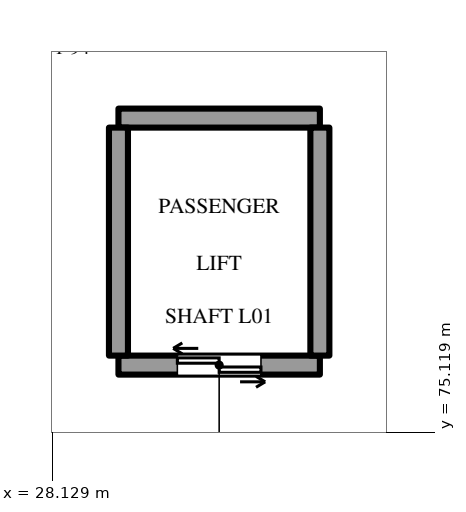
"""IFC4 building model, lengths in metres.
Left out: names, types, materials, properties, quantities, classifications, styles, units other than length and angle.
Written with IfcOpenShell. Run it as: python <this file> out.ifc"""

import sys

from ifc_helpers import new_model, si_unit, direction, frame, frame_2d, origin, place, context, subcontext, project, spatial, rectangle, extrude, element, fill, save


model = new_model("IFC4")
c1 = context("Model", 3, precision=1e-05, world=origin(), true_north=direction((0.0, 1.0)))
c2 = subcontext(c1, "Body", "Model", "MODEL_VIEW")
j1 = project(units=[si_unit("LENGTHUNIT", "METRE"), si_unit("PLANEANGLEUNIT", "RADIAN")], contexts=[c1])
p1 = place(None, origin())
s1 = spatial("IfcSite", under=j1, at=p1, CompositionType="ELEMENT")
p2 = place(p1, origin())
s2 = spatial("IfcBuilding", under=s1, at=p2, CompositionType="ELEMENT")
p3 = place(p2, frame((0.0, 0.0, 7.2)))
s3 = spatial("IfcBuildingStorey", under=s2, at=p3, CompositionType="ELEMENT", Elevation=7.2)
p4 = place(p3, frame((29.0, 76.0, 0.0), z_axis=(0.0, 0.0, 1.0), x_axis=(1.0, 0.0, 0.0)))
e1 = element("IfcWall", 1, at=p4, inside=s3, PredefinedType="SOLIDWALL", context=c2, shape_type="SweptSolid", body=[
    extrude(rectangle(XDim=2.65, YDim=0.25, at=frame_2d((1.325, 0.0))), origin(), (0.0, 0.0, 1.0), 4.45),
])
p5 = place(p4, frame((0.775, 0.0, 0.0)))
e2 = element("IfcOpeningElement", 2, at=p5, cuts=e1, PredefinedType="OPENING", context=c2, shape_type="SweptSolid", body=[
    extrude(rectangle(XDim=1.1, YDim=2.1, at=frame_2d((0.55, 1.05))), frame((0.0, 0.135, 0.0), z_axis=(0.0, -1.0, 0.0), x_axis=(1.0, 0.0, 0.0)), (0.0, 0.0, 1.0), 0.27),
])
p6 = place(p3, frame((29.0, 79.25, 0.0), z_axis=(0.0, 0.0, 1.0), x_axis=(1.0, 0.0, 0.0)))
e3 = element("IfcWall", 3, at=p6, inside=s3, PredefinedType="SOLIDWALL", context=c2, shape_type="SweptSolid", body=[
    extrude(rectangle(XDim=2.65, YDim=0.25, at=frame_2d((1.325, 0.0))), origin(), (0.0, 0.0, 1.0), 4.45),
])
for number, where, z_axis, x_axis in (
    (4, (29.0, 76.125, 0.0), (0.0, 0.0, 1.0), (0.0, 1.0, 0.0)),
    (5, (31.65, 76.125, 0.0), (0.0, 0.0, 1.0), (0.0, 1.0, 0.0)),
):
    element("IfcWall", number, at=place(p3, frame(where, z_axis=z_axis, x_axis=x_axis)), inside=s3, PredefinedType="SOLIDWALL", context=c2, shape_type="SweptSolid", body=[
        extrude(rectangle(XDim=3.0, YDim=0.25, at=frame_2d((1.5, 0.0))), origin(), (0.0, 0.0, 1.0), 4.45),
    ])
p7 = place(p5, origin())
e6 = element("IfcDoor", 6, at=p7, inside=s3, OperationType="DOUBLE_DOOR_SLIDING", PredefinedType="DOOR", context=c2, shape_type="SweptSolid", body=[
    extrude(rectangle(XDim=1.1, YDim=2.1, at=frame_2d((0.55, 1.05))), frame((0.0, 0.025, 0.0), z_axis=(0.0, -1.0, 0.0), x_axis=(1.0, 0.0, 0.0)), (0.0, 0.0, 1.0), 0.05),
])
fill(e2, e6)
save(model, sys.argv[1])
